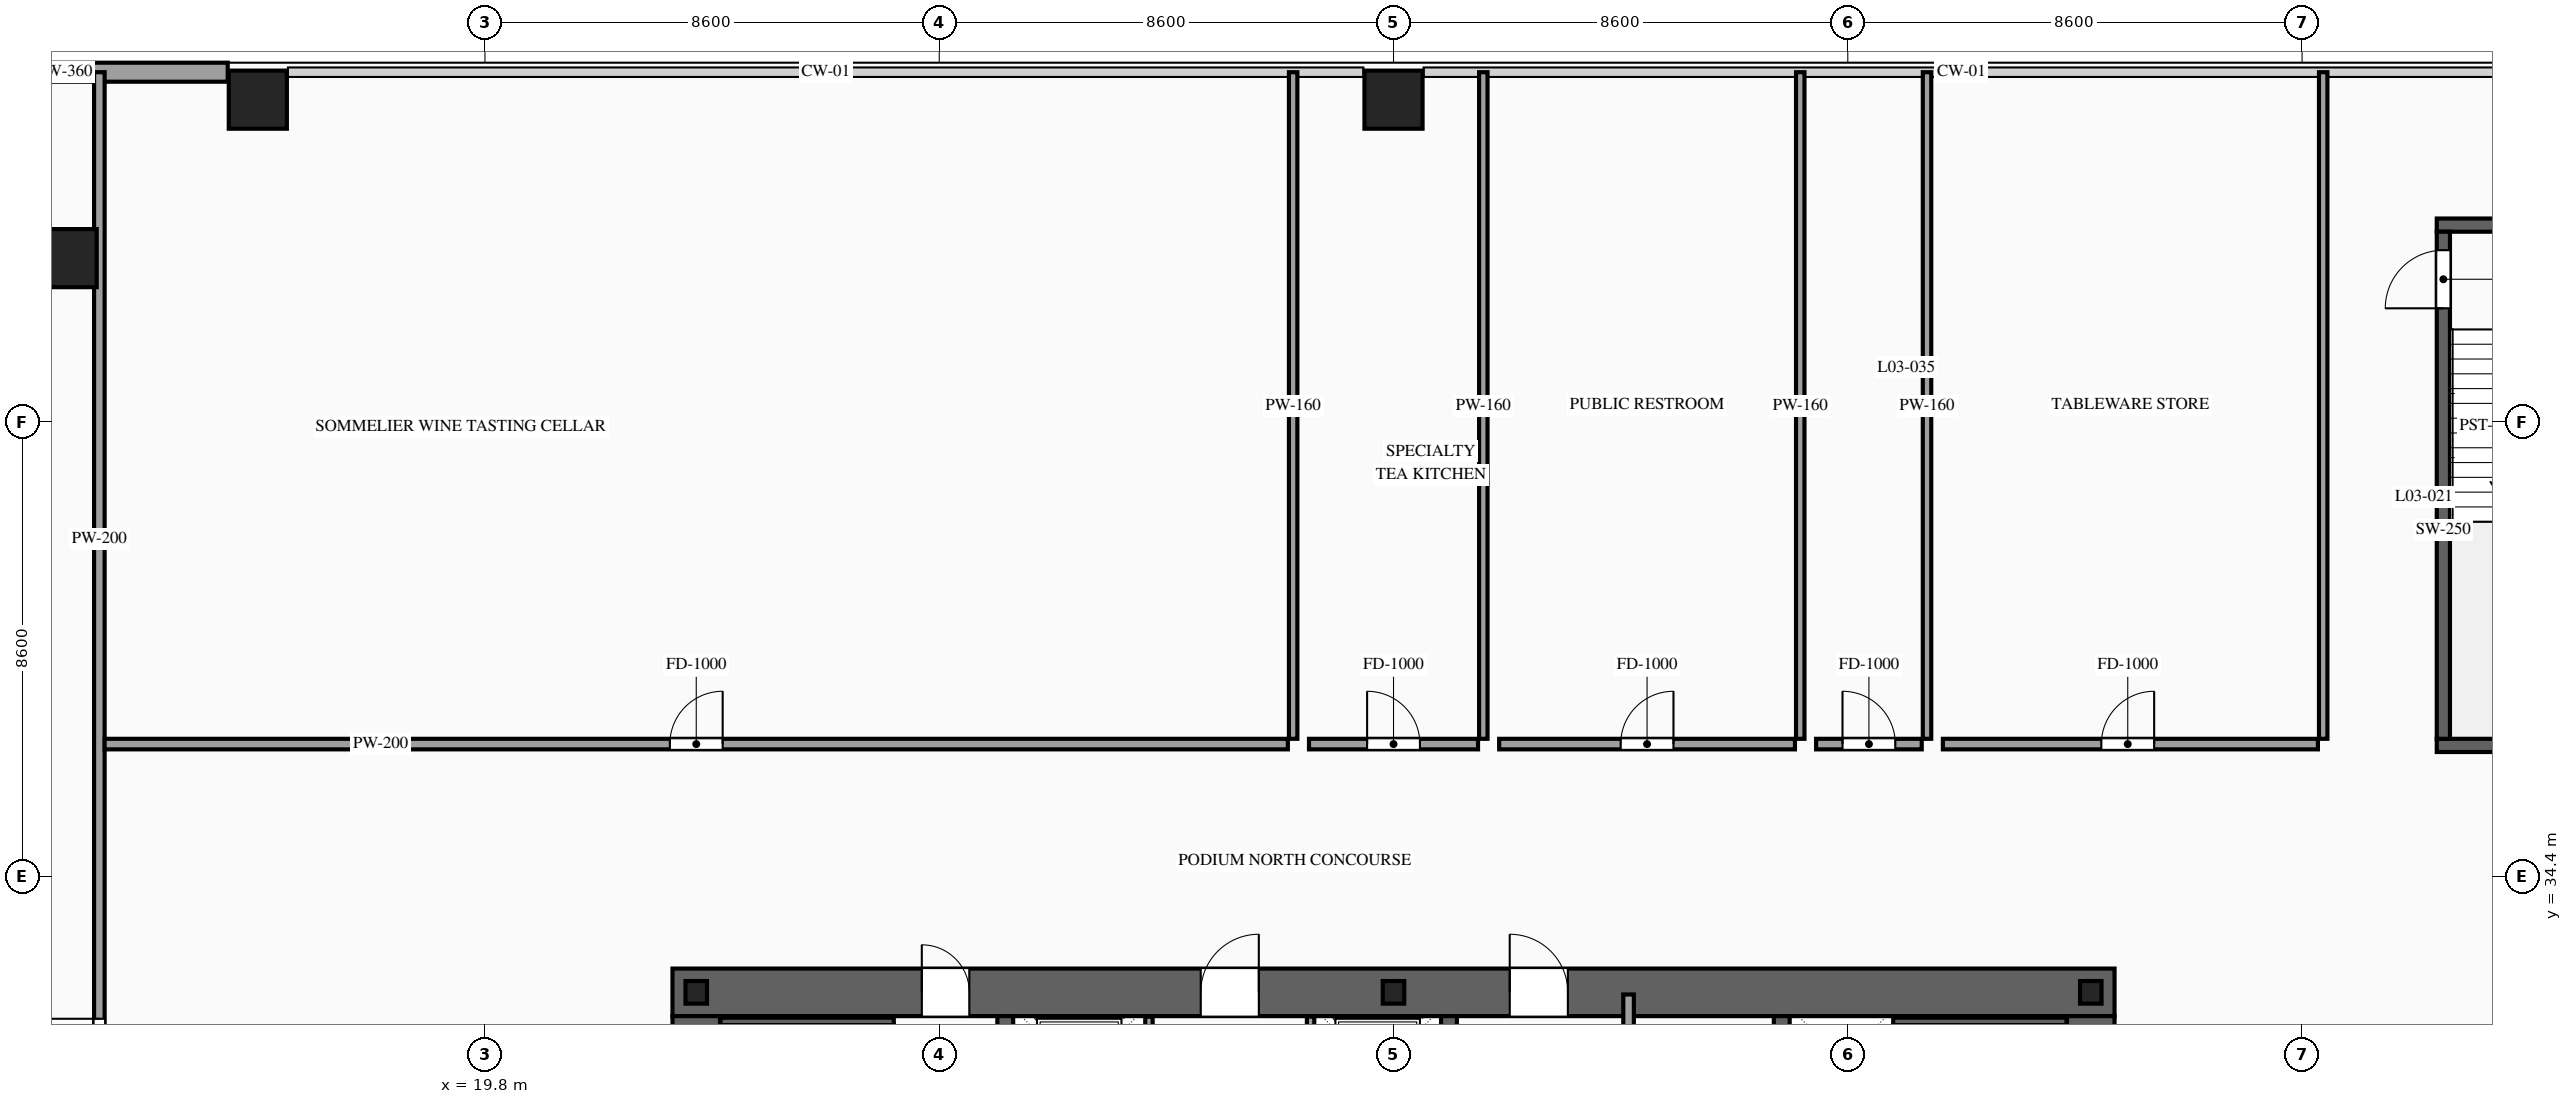
"""IFC4 building model, lengths in metres.
Left out: names, types, materials, properties, quantities, classifications, styles, units other than length and angle.
Written with IfcOpenShell. Run it as: python <this file> out.ifc"""

import sys

from ifc_helpers import new_model, si_unit, direction, frame, frame_2d, origin, origin_2d, place, context, subcontext, project, spatial, rectangle, i_section, extrude, source, transform, mapped, element, fill, save


model = new_model("IFC4")
c1 = context("Model", 3, precision=1e-05, world=origin(), true_north=direction((0.0, 1.0)))
c2 = subcontext(c1, "Body", "Model", "MODEL_VIEW")
j1 = project(units=[si_unit("LENGTHUNIT", "METRE"), si_unit("PLANEANGLEUNIT", "RADIAN")], contexts=[c1])
p1 = place(None, origin())
s1 = spatial("IfcSite", under=j1, at=p1, CompositionType="ELEMENT")
p2 = place(p1, origin())
s2 = spatial("IfcBuilding", under=s1, at=p2, CompositionType="ELEMENT")
p3 = place(p2, frame((0.0, 0.0, 10.2)))
s3 = spatial("IfcBuildingStorey", under=s2, at=p3, CompositionType="ELEMENT", Elevation=10.2)
p4 = place(p3, frame((23.35, 32.2, 0.0), z_axis=(0.0, 0.0, 1.0), x_axis=(1.0, 0.0, 0.0)))
e1 = element("IfcWall", 1, at=p4, inside=s3, PredefinedType="SHEAR", context=c2, shape_type="SweptSolid", body=[
    extrude(rectangle(XDim=27.3, YDim=0.9, at=frame_2d((13.65, 0.0))), origin(), (0.0, 0.0, 1.0), 4.8),
])
p5 = place(p4, frame((4.72, 0.0, 0.0)))
e2 = element("IfcOpeningElement", 2, at=p5, cuts=e1, PredefinedType="OPENING", context=c2, shape_type="SweptSolid", body=[
    extrude(rectangle(XDim=0.9, YDim=2.15, at=frame_2d((0.45, 1.075))), frame((0.0, 0.465, 0.0), z_axis=(0.0, -1.0, 0.0), x_axis=(1.0, 0.0, 0.0)), (0.0, 0.0, 1.0), 0.93),
])
p6 = place(p4, frame((10.0, 0.0, 0.0)))
e3 = element("IfcOpeningElement", 3, at=p6, cuts=e1, PredefinedType="OPENING", context=c2, shape_type="SweptSolid", body=[
    extrude(rectangle(XDim=1.1, YDim=2.2, at=frame_2d((0.55, 1.1))), frame((0.0, 0.465, 0.0), z_axis=(0.0, -1.0, 0.0), x_axis=(1.0, 0.0, 0.0)), (0.0, 0.0, 1.0), 0.93),
])
p7 = place(p4, frame((15.85, 0.0, 0.0)))
e4 = element("IfcOpeningElement", 4, at=p7, cuts=e1, PredefinedType="OPENING", context=c2, shape_type="SweptSolid", body=[
    extrude(rectangle(XDim=1.1, YDim=2.2, at=frame_2d((0.55, 1.1))), frame((0.0, 0.465, 0.0), z_axis=(0.0, -1.0, 0.0), x_axis=(1.0, 0.0, 0.0)), (0.0, 0.0, 1.0), 0.93),
])
m1 = source(origin(), c2, "Body", "SweptSolid", [
    extrude(rectangle(XDim=11.9, YDim=0.9, at=frame_2d((5.95, 0.0))), origin(), (0.0, 0.0, 1.0), 4.8),
])
for number, where, z_axis, x_axis in (
    (5, (23.8, 19.85, 0.0), (0.0, 0.0, 1.0), (0.0, 1.0, 0.0)),
    (6, (50.2, 19.85, 0.0), (0.0, 0.0, 1.0), (0.0, 1.0, 0.0)),
):
    element("IfcWall", number, at=place(p3, frame(where, z_axis=z_axis, x_axis=x_axis)), inside=s3, PredefinedType="SHEAR", context=c2, shape_type="MappedRepresentation", body=[
        mapped(m1, transform((0.0, 0.0, 0.0), scale=1.0)),
    ])
m2 = source(origin(), c2, "Body", "SweptSolid", [
    extrude(rectangle(XDim=11.9, YDim=0.3, at=frame_2d((5.95, 0.0))), origin(), (0.0, 0.0, 1.0), 4.8),
])
for number, where, z_axis, x_axis in (
    (7, (29.65, 19.85, 0.0), (0.0, 0.0, 1.0), (0.0, 1.0, 0.0)),
    (8, (38.05, 19.85, 0.0), (0.0, 0.0, 1.0), (0.0, 1.0, 0.0)),
    (9, (44.35, 19.85, 0.0), (0.0, 0.0, 1.0), (0.0, 1.0, 0.0)),
):
    element("IfcWall", number, at=place(p3, frame(where, z_axis=z_axis, x_axis=x_axis)), inside=s3, PredefinedType="SOLIDWALL", context=c2, shape_type="MappedRepresentation", body=[
        mapped(m2, transform((0.0, 0.0, 0.0), scale=1.0)),
    ])
m3 = source(origin(), c2, "Body", "SweptSolid", [
    extrude(i_section(OverallWidth=0.407, OverallDepth=0.428, WebThickness=0.02, FlangeThickness=0.035, at=origin_2d()), origin(), (0.0, 0.0, 1.0), 4.8),
])
for number, where, z_axis, x_axis in (
    (10, (23.8, 32.2, 0.0), (0.0, 0.0, 1.0), (1.0, 0.0, 0.0)),
    (11, (37.0, 32.2, 0.0), (0.0, 0.0, 1.0), (1.0, 0.0, 0.0)),
    (12, (50.2, 32.2, 0.0), (0.0, 0.0, 1.0), (1.0, 0.0, 0.0)),
):
    element("IfcColumn", number, at=place(p3, frame(where, z_axis=z_axis, x_axis=x_axis)), inside=s3, PredefinedType="COLUMN", context=c2, shape_type="MappedRepresentation", body=[
        mapped(m3, transform((0.0, 0.0, 0.0), scale=1.0)),
    ])
m4 = source(origin(), c2, "Body", "SweptSolid", [
    extrude(rectangle(XDim=1.1, YDim=1.1, at=origin_2d()), origin(), (0.0, 0.0, 1.0), 4.8),
])
for number, where, z_axis, x_axis in (
    (13, (11.9, 46.1, 0.0), (0.0, 0.0, 1.0), (1.0, 0.0, 0.0)),
    (14, (15.5, 49.1, 0.0), (0.0, 0.0, 1.0), (1.0, 0.0, 0.0)),
    (15, (37.0, 49.1, 0.0), (0.0, 0.0, 1.0), (1.0, 0.0, 0.0)),
):
    element("IfcColumn", number, at=place(p3, frame(where, z_axis=z_axis, x_axis=x_axis)), inside=s3, PredefinedType="COLUMN", context=c2, shape_type="MappedRepresentation", body=[
        mapped(m4, transform((0.0, 0.0, 0.0), scale=1.0)),
    ])
p8 = place(p3, frame((2.0, 49.62, 0.0), z_axis=(0.0, 0.0, 1.0), x_axis=(1.0, 0.0, 0.0)))
e16 = element("IfcWall", 16, at=p8, inside=s3, PredefinedType="SOLIDWALL", context=c2, shape_type="SweptSolid", body=[
    extrude(rectangle(XDim=12.93, YDim=0.36, at=frame_2d((6.465, 0.0))), origin(), (0.0, 0.0, 1.0), 4.52),
])
p9 = place(p8, frame((4.7, 0.0, 0.9)))
e17 = element("IfcOpeningElement", 17, at=p9, cuts=e16, PredefinedType="OPENING", context=c2, shape_type="SweptSolid", body=[
    extrude(rectangle(XDim=1.8, YDim=2.2, at=frame_2d((0.9, 1.1))), frame((0.0, 0.195, 0.0), z_axis=(0.0, -1.0, 0.0), x_axis=(1.0, 0.0, 0.0)), (0.0, 0.0, 1.0), 0.39),
])
p10 = place(p3, frame((32.37, 29.4, 0.0), z_axis=(0.0, 0.0, 1.0), x_axis=(0.0, 1.0, 0.0)))
e18 = element("IfcWall", 18, at=p10, inside=s3, PredefinedType="SOLIDWALL", context=c2, shape_type="SweptSolid", body=[
    extrude(rectangle(XDim=2.34, YDim=0.14, at=frame_2d((1.17, 0.0))), origin(), (0.0, 0.0, 1.0), 4.52),
])
p11 = place(p10, frame((0.62, 0.0, 0.0)))
e19 = element("IfcOpeningElement", 19, at=p11, cuts=e18, PredefinedType="OPENING", context=c2, shape_type="SweptSolid", body=[
    extrude(rectangle(XDim=1.1, YDim=2.2, at=frame_2d((0.55, 1.1))), frame((0.0, 0.085, 0.0), z_axis=(0.0, -1.0, 0.0), x_axis=(1.0, 0.0, 0.0)), (0.0, 0.0, 1.0), 0.17),
])
p12 = place(p3, frame((35.43, 29.4, 0.0), z_axis=(0.0, 0.0, 1.0), x_axis=(0.0, 1.0, 0.0)))
e20 = element("IfcWall", 20, at=p12, inside=s3, PredefinedType="SOLIDWALL", context=c2, shape_type="SweptSolid", body=[
    extrude(rectangle(XDim=2.34, YDim=0.14, at=frame_2d((1.17, 0.0))), origin(), (0.0, 0.0, 1.0), 4.52),
])
p13 = place(p12, frame((0.62, 0.0, 0.0)))
e21 = element("IfcOpeningElement", 21, at=p13, cuts=e20, PredefinedType="OPENING", context=c2, shape_type="SweptSolid", body=[
    extrude(rectangle(XDim=1.1, YDim=2.2, at=frame_2d((0.55, 1.1))), frame((0.0, 0.085, 0.0), z_axis=(0.0, -1.0, 0.0), x_axis=(1.0, 0.0, 0.0)), (0.0, 0.0, 1.0), 0.17),
])
m5 = source(origin(), c2, "Body", "SweptSolid", [
    extrude(rectangle(XDim=3.28, YDim=0.14, at=frame_2d((1.64, 0.0))), origin(), (0.0, 0.0, 1.0), 4.52),
])
for number, where, z_axis, x_axis in (
    (22, (24.26, 31.65, 0.0), (0.0, 0.0, 1.0), (1.0, 0.0, 0.0)),
    (23, (46.46, 31.65, 0.0), (0.0, 0.0, 1.0), (1.0, 0.0, 0.0)),
):
    element("IfcWall", number, at=place(p3, frame(where, z_axis=z_axis, x_axis=x_axis)), inside=s3, PredefinedType="SOLIDWALL", context=c2, shape_type="MappedRepresentation", body=[
        mapped(m5, transform((0.0, 0.0, 0.0), scale=1.0)),
    ])
m6 = source(origin(), c2, "Body", "SweptSolid", [
    extrude(rectangle(XDim=4.3, YDim=0.25, at=frame_2d((2.15, 0.0))), origin(), (0.0, 0.0, 1.0), 4.52),
])
p14 = place(p3, frame((56.75, 36.875, 0.0), z_axis=(0.0, 0.0, 1.0), x_axis=(1.0, 0.0, 0.0)))
e24 = element("IfcWall", 24, at=p14, inside=s3, PredefinedType="SOLIDWALL", context=c2, shape_type="MappedRepresentation", body=[
    mapped(m6, transform((0.0, 0.0, 0.0), scale=1.0)),
])
m7 = source(origin(), c2, "Body", "SweptSolid", [
    extrude(rectangle(XDim=4.8, YDim=0.25, at=frame_2d((2.4, 0.0))), origin(), (0.0, 0.0, 1.0), 4.52),
])
p15 = place(p3, frame((56.75, 46.725, 0.0), z_axis=(0.0, 0.0, 1.0), x_axis=(1.0, 0.0, 0.0)))
e25 = element("IfcWall", 25, at=p15, inside=s3, PredefinedType="SOLIDWALL", context=c2, shape_type="MappedRepresentation", body=[
    mapped(m7, transform((0.0, 0.0, 0.0), scale=1.0)),
])
p16 = place(p3, frame((56.875, 37.0, 0.0), z_axis=(0.0, 0.0, 1.0), x_axis=(0.0, 1.0, 0.0)))
e26 = element("IfcWall", 26, at=p16, inside=s3, PredefinedType="SOLIDWALL", context=c2, shape_type="SweptSolid", body=[
    extrude(rectangle(XDim=9.6, YDim=0.25, at=frame_2d((4.8, 0.0))), origin(), (0.0, 0.0, 1.0), 4.52),
])
p17 = place(p16, frame((8.15, 0.0, 0.0)))
e27 = element("IfcOpeningElement", 27, at=p17, cuts=e26, PredefinedType="OPENING", context=c2, shape_type="SweptSolid", body=[
    extrude(rectangle(XDim=1.1, YDim=2.2, at=frame_2d((0.55, 1.1))), frame((0.0, 0.14, 0.0), z_axis=(0.0, -1.0, 0.0), x_axis=(1.0, 0.0, 0.0)), (0.0, 0.0, 1.0), 0.28),
])
m8 = source(origin(), c2, "Body", "SweptSolid", [
    extrude(rectangle(XDim=12.72, YDim=0.2, at=frame_2d((6.36, 0.0))), origin(), (0.0, 0.0, 1.0), 4.52),
])
p18 = place(p3, frame((41.45, 19.44, 0.0), z_axis=(0.0, 0.0, 1.0), x_axis=(0.0, 1.0, 0.0)))
e28 = element("IfcWall", 28, at=p18, inside=s3, PredefinedType="PARTITIONING", context=c2, shape_type="MappedRepresentation", body=[
    mapped(m8, transform((0.0, 0.0, 0.0), scale=1.0)),
])
p19 = place(p3, frame((12.5, 29.0, 0.0), z_axis=(0.0, 0.0, 1.0), x_axis=(0.0, 1.0, 0.0)))
e29 = element("IfcWall", 29, at=p19, inside=s3, PredefinedType="PARTITIONING", context=c2, shape_type="SweptSolid", body=[
    extrude(rectangle(XDim=20.62, YDim=0.2, at=frame_2d((10.31, 0.0))), origin(), (0.0, 0.0, 1.0), 4.52),
])
p20 = place(p19, frame((1.7, 0.0, 0.0)))
e30 = element("IfcOpeningElement", 30, at=p20, cuts=e29, PredefinedType="OPENING", context=c2, shape_type="SweptSolid", body=[
    extrude(rectangle(XDim=1.0, YDim=2.2, at=frame_2d((0.5, 1.1))), frame((0.0, 0.115, 0.0), z_axis=(0.0, -1.0, 0.0), x_axis=(1.0, 0.0, 0.0)), (0.0, 0.0, 1.0), 0.23),
])
p21 = place(p3, frame((12.6, 36.9, 0.0), z_axis=(0.0, 0.0, 1.0), x_axis=(1.0, 0.0, 0.0)))
e31 = element("IfcWall", 31, at=p21, inside=s3, PredefinedType="PARTITIONING", context=c2, shape_type="SweptSolid", body=[
    extrude(rectangle(XDim=22.4, YDim=0.2, at=frame_2d((11.2, 0.0))), origin(), (0.0, 0.0, 1.0), 4.52),
])
p22 = place(p21, frame((10.7, 0.0, 0.0)))
e32 = element("IfcOpeningElement", 32, at=p22, cuts=e31, PredefinedType="OPENING", context=c2, shape_type="SweptSolid", body=[
    extrude(rectangle(XDim=1.0, YDim=2.2, at=frame_2d((0.5, 1.1))), frame((0.0, 0.115, 0.0), z_axis=(0.0, -1.0, 0.0), x_axis=(1.0, 0.0, 0.0)), (0.0, 0.0, 1.0), 0.23),
])
m9 = source(origin(), c2, "Body", "SweptSolid", [
    extrude(rectangle(XDim=12.62, YDim=0.16, at=frame_2d((6.31, 0.0))), origin(), (0.0, 0.0, 1.0), 4.52),
])
p23 = place(p3, frame((35.1, 37.0, 0.0), z_axis=(0.0, 0.0, 1.0), x_axis=(0.0, 1.0, 0.0)))
e33 = element("IfcWall", 33, at=p23, inside=s3, PredefinedType="PARTITIONING", context=c2, shape_type="MappedRepresentation", body=[
    mapped(m9, transform((0.0, 0.0, 0.0), scale=1.0)),
])
p24 = place(p3, frame((35.4, 36.9, 0.0), z_axis=(0.0, 0.0, 1.0), x_axis=(1.0, 0.0, 0.0)))
e34 = element("IfcWall", 34, at=p24, inside=s3, PredefinedType="PARTITIONING", context=c2, shape_type="SweptSolid", body=[
    extrude(rectangle(XDim=3.2, YDim=0.2, at=frame_2d((1.6, 0.0))), origin(), (0.0, 0.0, 1.0), 4.52),
])
p25 = place(p24, frame((1.1, 0.0, 0.0)))
e35 = element("IfcOpeningElement", 35, at=p25, cuts=e34, PredefinedType="OPENING", context=c2, shape_type="SweptSolid", body=[
    extrude(rectangle(XDim=1.0, YDim=2.2, at=frame_2d((0.5, 1.1))), frame((0.0, 0.115, 0.0), z_axis=(0.0, -1.0, 0.0), x_axis=(1.0, 0.0, 0.0)), (0.0, 0.0, 1.0), 0.23),
])
p26 = place(p3, frame((38.7, 37.0, 0.0), z_axis=(0.0, 0.0, 1.0), x_axis=(0.0, 1.0, 0.0)))
e36 = element("IfcWall", 36, at=p26, inside=s3, PredefinedType="PARTITIONING", context=c2, shape_type="MappedRepresentation", body=[
    mapped(m9, transform((0.0, 0.0, 0.0), scale=1.0)),
])
p27 = place(p3, frame((39.0, 36.9, 0.0), z_axis=(0.0, 0.0, 1.0), x_axis=(1.0, 0.0, 0.0)))
e37 = element("IfcWall", 37, at=p27, inside=s3, PredefinedType="PARTITIONING", context=c2, shape_type="SweptSolid", body=[
    extrude(rectangle(XDim=5.6, YDim=0.2, at=frame_2d((2.8, 0.0))), origin(), (0.0, 0.0, 1.0), 4.52),
])
p28 = place(p27, frame((2.3, 0.0, 0.0)))
e38 = element("IfcOpeningElement", 38, at=p28, cuts=e37, PredefinedType="OPENING", context=c2, shape_type="SweptSolid", body=[
    extrude(rectangle(XDim=1.0, YDim=2.2, at=frame_2d((0.5, 1.1))), frame((0.0, 0.115, 0.0), z_axis=(0.0, -1.0, 0.0), x_axis=(1.0, 0.0, 0.0)), (0.0, 0.0, 1.0), 0.23),
])
p29 = place(p3, frame((44.7, 37.0, 0.0), z_axis=(0.0, 0.0, 1.0), x_axis=(0.0, 1.0, 0.0)))
e39 = element("IfcWall", 39, at=p29, inside=s3, PredefinedType="PARTITIONING", context=c2, shape_type="MappedRepresentation", body=[
    mapped(m9, transform((0.0, 0.0, 0.0), scale=1.0)),
])
p30 = place(p3, frame((45.0, 36.9, 0.0), z_axis=(0.0, 0.0, 1.0), x_axis=(1.0, 0.0, 0.0)))
e40 = element("IfcWall", 40, at=p30, inside=s3, PredefinedType="PARTITIONING", context=c2, shape_type="SweptSolid", body=[
    extrude(rectangle(XDim=2.0, YDim=0.2, at=frame_2d((1.0, 0.0))), origin(), (0.0, 0.0, 1.0), 4.52),
])
p31 = place(p30, frame((0.5, 0.0, 0.0)))
e41 = element("IfcOpeningElement", 41, at=p31, cuts=e40, PredefinedType="OPENING", context=c2, shape_type="SweptSolid", body=[
    extrude(rectangle(XDim=1.0, YDim=2.2, at=frame_2d((0.5, 1.1))), frame((0.0, 0.115, 0.0), z_axis=(0.0, -1.0, 0.0), x_axis=(1.0, 0.0, 0.0)), (0.0, 0.0, 1.0), 0.23),
])
p32 = place(p3, frame((47.1, 37.0, 0.0), z_axis=(0.0, 0.0, 1.0), x_axis=(0.0, 1.0, 0.0)))
e42 = element("IfcWall", 42, at=p32, inside=s3, PredefinedType="PARTITIONING", context=c2, shape_type="MappedRepresentation", body=[
    mapped(m9, transform((0.0, 0.0, 0.0), scale=1.0)),
])
p33 = place(p3, frame((47.4, 36.9, 0.0), z_axis=(0.0, 0.0, 1.0), x_axis=(1.0, 0.0, 0.0)))
e43 = element("IfcWall", 43, at=p33, inside=s3, PredefinedType="PARTITIONING", context=c2, shape_type="SweptSolid", body=[
    extrude(rectangle(XDim=7.1, YDim=0.2, at=frame_2d((3.55, 0.0))), origin(), (0.0, 0.0, 1.0), 4.52),
])
p34 = place(p33, frame((3.0, 0.0, 0.0)))
e44 = element("IfcOpeningElement", 44, at=p34, cuts=e43, PredefinedType="OPENING", context=c2, shape_type="SweptSolid", body=[
    extrude(rectangle(XDim=1.0, YDim=2.2, at=frame_2d((0.5, 1.1))), frame((0.0, 0.115, 0.0), z_axis=(0.0, -1.0, 0.0), x_axis=(1.0, 0.0, 0.0)), (0.0, 0.0, 1.0), 0.23),
])
p35 = place(p3, frame((54.6, 37.0, 0.0), z_axis=(0.0, 0.0, 1.0), x_axis=(0.0, 1.0, 0.0)))
e45 = element("IfcWall", 45, at=p35, inside=s3, PredefinedType="PARTITIONING", context=c2, shape_type="MappedRepresentation", body=[
    mapped(m9, transform((0.0, 0.0, 0.0), scale=1.0)),
])
m10 = source(origin(), c2, "Body", "SweptSolid", [
    extrude(rectangle(XDim=1.1, YDim=2.2, at=frame_2d((0.55, 1.1))), frame((0.0, 0.025, 0.0), z_axis=(0.0, -1.0, 0.0), x_axis=(1.0, 0.0, 0.0)), (0.0, 0.0, 1.0), 0.05),
])
p36 = place(p17, origin())
e46 = element("IfcDoor", 46, at=p36, inside=s3, OperationType="SINGLE_SWING_LEFT", PredefinedType="DOOR", context=c2, shape_type="MappedRepresentation", body=[
    mapped(m10, transform((0.0, 0.0, 0.0), scale=1.0)),
])
fill(e27, e46)
m11 = source(origin(), c2, "Body", "SweptSolid", [
    extrude(rectangle(XDim=0.9, YDim=2.15, at=frame_2d((0.45, 1.075))), frame((0.0, 0.025, 0.0), z_axis=(0.0, -1.0, 0.0), x_axis=(1.0, 0.0, 0.0)), (0.0, 0.0, 1.0), 0.05),
])
p37 = place(p5, origin())
e47 = element("IfcDoor", 47, at=p37, inside=s3, OperationType="SINGLE_SWING_LEFT", PredefinedType="DOOR", context=c2, shape_type="MappedRepresentation", body=[
    mapped(m11, transform((0.0, 0.0, 0.0), scale=1.0)),
])
fill(e2, e47)
p38 = place(p6, origin())
e48 = element("IfcDoor", 48, at=p38, inside=s3, OperationType="SINGLE_SWING_RIGHT", PredefinedType="DOOR", context=c2, shape_type="MappedRepresentation", body=[
    mapped(m10, transform((0.0, 0.0, 0.0), scale=1.0)),
])
fill(e3, e48)
p39 = place(p7, origin())
e49 = element("IfcDoor", 49, at=p39, inside=s3, OperationType="SINGLE_SWING_LEFT", PredefinedType="DOOR", context=c2, shape_type="MappedRepresentation", body=[
    mapped(m10, transform((0.0, 0.0, 0.0), scale=1.0)),
])
fill(e4, e49)
m12 = source(origin(), c2, "Body", "SweptSolid", [
    extrude(rectangle(XDim=1.0, YDim=2.2, at=frame_2d((0.5, 1.1))), frame((0.0, 0.025, 0.0), z_axis=(0.0, -1.0, 0.0), x_axis=(1.0, 0.0, 0.0)), (0.0, 0.0, 1.0), 0.05),
])
p40 = place(p20, origin())
e50 = element("IfcDoor", 50, at=p40, inside=s3, OperationType="SINGLE_SWING_RIGHT", PredefinedType="DOOR", context=c2, shape_type="MappedRepresentation", body=[
    mapped(m12, transform((0.0, 0.0, 0.0), scale=1.0)),
])
fill(e30, e50)
p41 = place(p22, origin())
e51 = element("IfcDoor", 51, at=p41, inside=s3, OperationType="SINGLE_SWING_RIGHT", PredefinedType="DOOR", context=c2, shape_type="MappedRepresentation", body=[
    mapped(m12, transform((0.0, 0.0, 0.0), scale=1.0)),
])
fill(e32, e51)
p42 = place(p25, origin())
e52 = element("IfcDoor", 52, at=p42, inside=s3, OperationType="SINGLE_SWING_LEFT", PredefinedType="DOOR", context=c2, shape_type="MappedRepresentation", body=[
    mapped(m12, transform((0.0, 0.0, 0.0), scale=1.0)),
])
fill(e35, e52)
p43 = place(p28, origin())
e53 = element("IfcDoor", 53, at=p43, inside=s3, OperationType="SINGLE_SWING_RIGHT", PredefinedType="DOOR", context=c2, shape_type="MappedRepresentation", body=[
    mapped(m12, transform((0.0, 0.0, 0.0), scale=1.0)),
])
fill(e38, e53)
p44 = place(p31, origin())
e54 = element("IfcDoor", 54, at=p44, inside=s3, OperationType="SINGLE_SWING_LEFT", PredefinedType="DOOR", context=c2, shape_type="MappedRepresentation", body=[
    mapped(m12, transform((0.0, 0.0, 0.0), scale=1.0)),
])
fill(e41, e54)
p45 = place(p34, origin())
e55 = element("IfcDoor", 55, at=p45, inside=s3, OperationType="SINGLE_SWING_RIGHT", PredefinedType="DOOR", context=c2, shape_type="MappedRepresentation", body=[
    mapped(m12, transform((0.0, 0.0, 0.0), scale=1.0)),
])
fill(e44, e55)
save(model, sys.argv[1])
